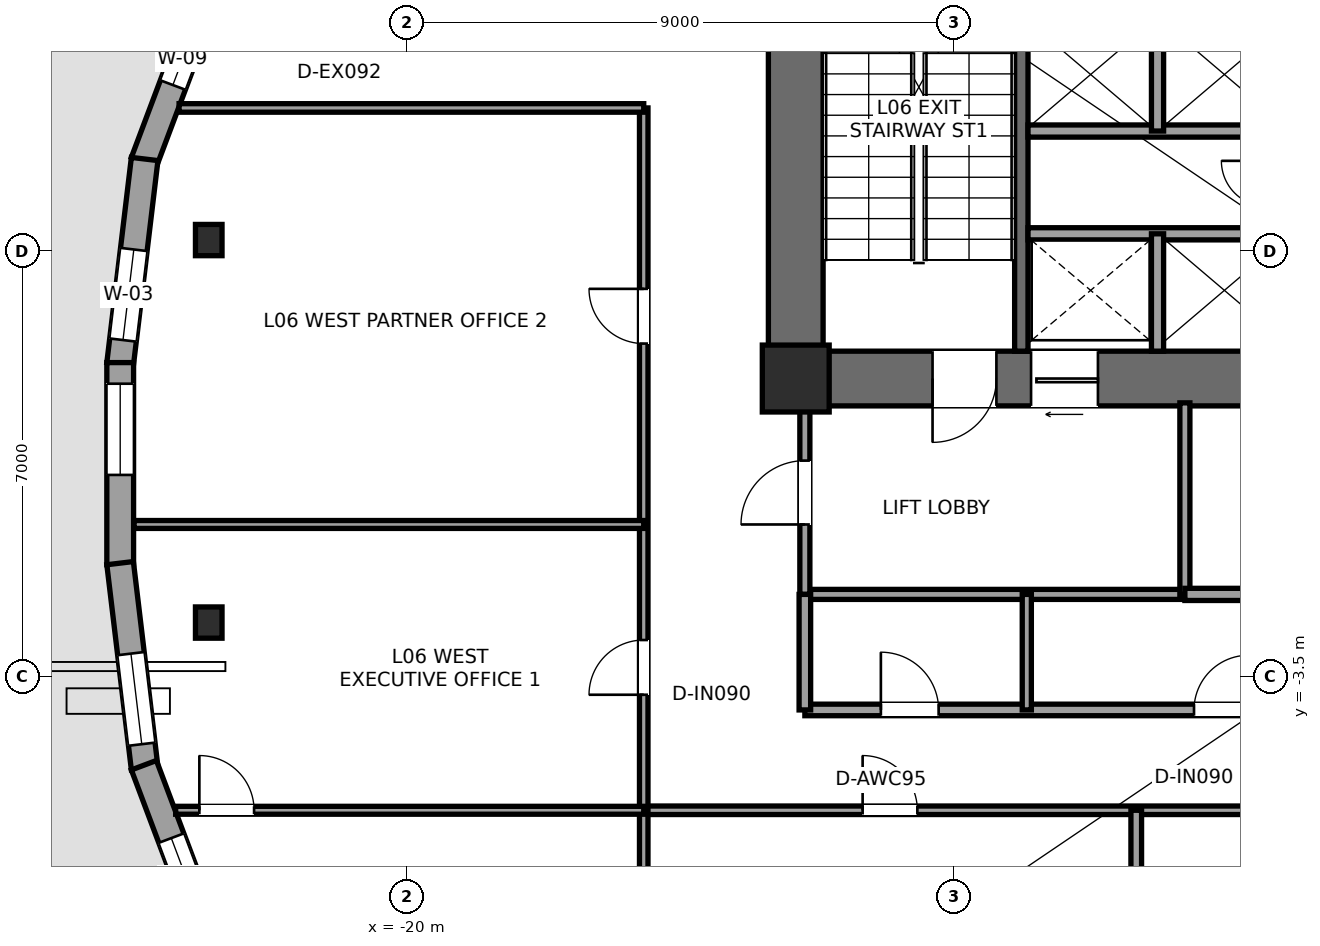
"""IFC4 building model, lengths in metres.
Left out: names, types, materials, properties, quantities, classifications, styles, units other than length and angle.
Written with IfcOpenShell. Run it as: python <this file> out.ifc"""

import sys

from ifc_helpers import new_model, si_unit, direction, frame, frame_2d, origin, origin_2d, place, context, subcontext, project, spatial, rectangle, i_section, extrude, element, fill, save


model = new_model("IFC4")
c1 = context("Model", 3, precision=1e-05, world=origin(), true_north=direction((0.0, 1.0)))
c2 = subcontext(c1, "Body", "Model", "MODEL_VIEW")
j1 = project(units=[si_unit("LENGTHUNIT", "METRE"), si_unit("PLANEANGLEUNIT", "RADIAN")], contexts=[c1])
p1 = place(None, origin())
s1 = spatial("IfcSite", under=j1, at=p1, CompositionType="ELEMENT")
p2 = place(p1, origin())
s2 = spatial("IfcBuilding", under=s1, at=p2, CompositionType="ELEMENT")
p3 = place(p2, frame((0.0, 0.0, 27.0)))
s3 = spatial("IfcBuildingStorey", under=s2, at=p3, CompositionType="ELEMENT", Elevation=27.0)
p4 = place(p3, frame((-13.6, 0.95, 0.0), z_axis=(0.0, 0.0, 1.0), x_axis=(0.0, 1.0, 0.0)))
e1 = element("IfcWall", 1, at=p4, inside=s3, PredefinedType="SHEAR", context=c2, shape_type="SweptSolid", body=[
    extrude(rectangle(XDim=8.95, YDim=0.9, at=frame_2d((4.475, 0.0))), origin(), (0.0, 0.0, 1.0), 3.6),
])
p5 = place(p3, frame((-4.75, 1.4, 0.0), z_axis=(0.0, 0.0, 1.0), x_axis=(-1.0, 0.0, 0.0)))
e2 = element("IfcWall", 2, at=p5, inside=s3, PredefinedType="SHEAR", context=c2, shape_type="SweptSolid", body=[
    extrude(rectangle(XDim=9.3, YDim=0.9, at=frame_2d((4.65, 0.0))), origin(), (0.0, 0.0, 1.0), 3.6),
])
p6 = place(p5, frame((5.55, 0.0, 0.0)))
e3 = element("IfcOpeningElement", 3, at=p6, cuts=e2, PredefinedType="OPENING", context=c2, shape_type="SweptSolid", body=[
    extrude(rectangle(XDim=1.05, YDim=2.15, at=frame_2d((0.525, 1.075))), frame((0.0, 0.46, 0.0), z_axis=(0.0, -1.0, 0.0), x_axis=(1.0, 0.0, 0.0)), (0.0, 0.0, 1.0), 0.92),
])
p7 = place(p5, frame((3.88, 0.0, 0.0)))
e4 = element("IfcOpeningElement", 4, at=p7, cuts=e2, PredefinedType="OPENING", context=c2, shape_type="SweptSolid", body=[
    extrude(rectangle(XDim=1.1, YDim=2.2, at=frame_2d((0.55, 1.1))), frame((0.0, 0.46, 0.0), z_axis=(0.0, -1.0, 0.0), x_axis=(1.0, 0.0, 0.0)), (0.0, 0.0, 1.0), 0.92),
])
p8 = place(p3, frame((-9.89, 1.85, 0.0), z_axis=(0.0, 0.0, 1.0), x_axis=(0.0, 1.0, 0.0)))
e5 = element("IfcWall", 5, at=p8, inside=s3, PredefinedType="SHEAR", context=c2, shape_type="SweptSolid", body=[
    extrude(rectangle(XDim=7.15, YDim=0.22, at=frame_2d((3.575, 0.0))), origin(), (0.0, 0.0, 1.0), 3.6),
])
p9 = place(p3, frame((-13.6, 1.4, 0.0), z_axis=(0.0, 0.0, 1.0), x_axis=(1.0, 0.0, 0.0)))
e6 = element("IfcColumn", 6, at=p9, inside=s3, PredefinedType="COLUMN", context=c2, shape_type="SweptSolid", body=[
    extrude(rectangle(XDim=1.1, YDim=1.1, at=origin_2d()), origin(), (0.0, 0.0, 1.0), 3.6),
])
for number, where, z_axis, x_axis in (
    (7, (-23.254, 3.677, 0.0), (0.0, 0.0, 1.0), (1.0, 0.0, 0.0)),
    (8, (-23.254, -2.613, 0.0), (0.0, 0.0, 1.0), (1.0, 0.0, 0.0)),
):
    element("IfcColumn", number, at=place(p3, frame(where, z_axis=z_axis, x_axis=x_axis)), inside=s3, PredefinedType="COLUMN", context=c2, shape_type="SweptSolid", body=[
        extrude(i_section(OverallWidth=0.437, OverallDepth=0.514, WebThickness=0.061, FlangeThickness=0.097, at=origin_2d()), origin(), (0.0, 0.0, 1.0), 3.6),
    ])
p10 = place(p3, frame((-24.321, 4.959, 0.0), z_axis=(0.0, 0.0, 1.0), x_axis=(0.351960996761, 0.936014666957, 0.0)))
e9 = element("IfcWall", 9, at=p10, inside=s3, PredefinedType="STANDARD", context=c2, shape_type="SweptSolid", body=[
    extrude(rectangle(XDim=3.609, YDim=0.44, at=frame_2d((1.805, 0.0))), origin(), (0.0, 0.0, 1.0), 2.533),
])
p11 = place(p10, frame((1.354, 0.0, 0.58)))
e10 = element("IfcOpeningElement", 10, at=p11, cuts=e9, PredefinedType="OPENING", context=c2, shape_type="SweptSolid", body=[
    extrude(rectangle(XDim=0.9, YDim=1.35, at=frame_2d((0.45, 0.675))), frame((0.0, 0.23, 0.0), z_axis=(0.0, -1.0, 0.0), x_axis=(1.0, 0.0, 0.0)), (0.0, 0.0, 1.0), 0.46),
])
p12 = place(p3, frame((-24.712, 1.636, 0.0), z_axis=(0.0, 0.0, 1.0), x_axis=(0.118754274869, 0.992923673905, 0.0)))
e11 = element("IfcWall", 11, at=p12, inside=s3, PredefinedType="STANDARD", context=c2, shape_type="SweptSolid", body=[
    extrude(rectangle(XDim=3.398, YDim=0.44, at=frame_2d((1.699, 0.0))), origin(), (0.0, 0.0, 1.0), 2.533),
])
p13 = place(p12, frame((0.4, 0.0, 0.65)))
e12 = element("IfcOpeningElement", 12, at=p13, cuts=e11, PredefinedType="OPENING", context=c2, shape_type="SweptSolid", body=[
    extrude(rectangle(XDim=1.5, YDim=1.7, at=frame_2d((0.75, 0.85))), frame((0.0, 0.23, 0.0), z_axis=(0.0, -1.0, 0.0), x_axis=(1.0, 0.0, 0.0)), (0.0, 0.0, 1.0), 0.46),
])
p14 = place(p3, frame((-24.71, -1.662, 0.0), z_axis=(0.0, 0.0, 1.0), x_axis=(0.0, 1.0, 0.0)))
e13 = element("IfcWall", 13, at=p14, inside=s3, PredefinedType="STANDARD", context=c2, shape_type="SweptSolid", body=[
    extrude(rectangle(XDim=3.324, YDim=0.44, at=frame_2d((1.662, 0.0))), origin(), (0.0, 0.0, 1.0), 2.533),
])
p15 = place(p14, frame((1.477, 0.0, 0.65)))
e14 = element("IfcOpeningElement", 14, at=p15, cuts=e13, PredefinedType="OPENING", context=c2, shape_type="SweptSolid", body=[
    extrude(rectangle(XDim=1.5, YDim=1.7, at=frame_2d((0.75, 0.85))), frame((0.0, 0.23, 0.0), z_axis=(0.0, -1.0, 0.0), x_axis=(1.0, 0.0, 0.0)), (0.0, 0.0, 1.0), 0.46),
])
p16 = place(p3, frame((-24.308, -5.01, 0.0), z_axis=(0.0, 0.0, 1.0), x_axis=(-0.118754274869, 0.992923673905, 0.0)))
e15 = element("IfcWall", 15, at=p16, inside=s3, PredefinedType="STANDARD", context=c2, shape_type="SweptSolid", body=[
    extrude(rectangle(XDim=3.398, YDim=0.44, at=frame_2d((1.699, 0.0))), origin(), (0.0, 0.0, 1.0), 2.533),
])
p17 = place(p16, frame((0.4, 0.0, 0.65)))
e16 = element("IfcOpeningElement", 16, at=p17, cuts=e15, PredefinedType="OPENING", context=c2, shape_type="SweptSolid", body=[
    extrude(rectangle(XDim=1.5, YDim=1.7, at=frame_2d((0.75, 0.85))), frame((0.0, 0.23, 0.0), z_axis=(0.0, -1.0, 0.0), x_axis=(1.0, 0.0, 0.0)), (0.0, 0.0, 1.0), 0.46),
])
p18 = place(p3, frame((-23.05, -8.337, 0.0), z_axis=(0.0, 0.0, 1.0), x_axis=(-0.351960996761, 0.936014666957, 0.0)))
e17 = element("IfcWall", 17, at=p18, inside=s3, PredefinedType="STANDARD", context=c2, shape_type="SweptSolid", body=[
    extrude(rectangle(XDim=3.609, YDim=0.44, at=frame_2d((1.805, 0.0))), origin(), (0.0, 0.0, 1.0), 2.533),
])
p19 = place(p18, frame((1.428, 0.0, 0.58)))
e18 = element("IfcOpeningElement", 18, at=p19, cuts=e17, PredefinedType="OPENING", context=c2, shape_type="SweptSolid", body=[
    extrude(rectangle(XDim=0.9, YDim=1.35, at=frame_2d((0.45, 0.675))), frame((0.0, 0.23, 0.0), z_axis=(0.0, -1.0, 0.0), x_axis=(1.0, 0.0, 0.0)), (0.0, 0.0, 1.0), 0.46),
])
p20 = place(p3, frame((-13.45, -2.15, 0.0), z_axis=(0.0, 0.0, 1.0), x_axis=(1.0, 0.0, 0.0)))
e19 = element("IfcWall", 19, at=p20, inside=s3, PredefinedType="PARTITIONING", context=c2, shape_type="SweptSolid", body=[
    extrude(rectangle(XDim=6.25, YDim=0.165, at=frame_2d((3.125, 0.0))), origin(), (0.0, 0.0, 1.0), 3.4),
])
p21 = place(p3, frame((-13.45, -2.15, 0.0), z_axis=(0.0, 0.0, 1.0), x_axis=(0.0, 1.0, 0.0)))
e20 = element("IfcWall", 20, at=p21, inside=s3, PredefinedType="PARTITIONING", context=c2, shape_type="SweptSolid", body=[
    extrude(rectangle(XDim=3.15, YDim=0.165, at=frame_2d((1.575, 0.0))), origin(), (0.0, 0.0, 1.0), 2.853),
])
p22 = place(p21, frame((1.15, 0.0, 0.0)))
e21 = element("IfcOpeningElement", 21, at=p22, cuts=e20, PredefinedType="OPENING", context=c2, shape_type="SweptSolid", body=[
    extrude(rectangle(XDim=1.05, YDim=2.15, at=frame_2d((0.525, 1.075))), frame((0.0, 0.093, 0.0), z_axis=(0.0, -1.0, 0.0), x_axis=(1.0, 0.0, 0.0)), (0.0, 0.0, 1.0), 0.185),
])
p23 = place(p3, frame((-7.2, -2.15, 0.0), z_axis=(0.0, 0.0, 1.0), x_axis=(0.0, 1.0, 0.0)))
e22 = element("IfcWall", 22, at=p23, inside=s3, PredefinedType="PARTITIONING", context=c2, shape_type="SweptSolid", body=[
    extrude(rectangle(XDim=3.15, YDim=0.165, at=frame_2d((1.575, 0.0))), origin(), (0.0, 0.0, 1.0), 2.853),
])
p24 = place(p3, frame((-7.2, -2.15, 0.0), z_axis=(0.0, 0.0, 1.0), x_axis=(1.0, 0.0, 0.0)))
e23 = element("IfcWall", 23, at=p24, inside=s3, PredefinedType="SOLIDWALL", context=c2, shape_type="SweptSolid", body=[
    extrude(rectangle(XDim=2.25, YDim=0.2, at=frame_2d((1.125, 0.0))), origin(), (0.0, 0.0, 1.0), 3.4),
])
p25 = place(p3, frame((-9.78, 3.78, 0.0), z_axis=(0.0, 0.0, 1.0), x_axis=(1.0, 0.0, 0.0)))
e24 = element("IfcWall", 24, at=p25, inside=s3, PredefinedType="SOLIDWALL", context=c2, shape_type="SweptSolid", body=[
    extrude(rectangle(XDim=4.13, YDim=0.2, at=frame_2d((2.065, 0.0))), origin(), (0.0, 0.0, 1.0), 3.4),
])
p26 = place(p3, frame((-7.65, 1.85, 0.0), z_axis=(0.0, 0.0, 1.0), x_axis=(0.0, 1.0, 0.0)))
e25 = element("IfcWall", 25, at=p26, inside=s3, PredefinedType="SOLIDWALL", context=c2, shape_type="SweptSolid", body=[
    extrude(rectangle(XDim=1.93, YDim=0.2, at=frame_2d((0.965, 0.0))), origin(), (0.0, 0.0, 1.0), 3.4),
])
p27 = place(p3, frame((-9.78, 5.47, 0.0), z_axis=(0.0, 0.0, 1.0), x_axis=(1.0, 0.0, 0.0)))
e26 = element("IfcWall", 26, at=p27, inside=s3, PredefinedType="SOLIDWALL", context=c2, shape_type="SweptSolid", body=[
    extrude(rectangle(XDim=4.13, YDim=0.2, at=frame_2d((2.065, 0.0))), origin(), (0.0, 0.0, 1.0), 3.4),
])
p28 = place(p3, frame((-7.65, 5.47, 0.0), z_axis=(0.0, 0.0, 1.0), x_axis=(0.0, 1.0, 0.0)))
e27 = element("IfcWall", 27, at=p28, inside=s3, PredefinedType="SOLIDWALL", context=c2, shape_type="SweptSolid", body=[
    extrude(rectangle(XDim=1.86, YDim=0.2, at=frame_2d((0.93, 0.0))), origin(), (0.0, 0.0, 1.0), 3.4),
])
p29 = place(p3, frame((-13.45, -4.05, 0.0), z_axis=(0.0, 0.0, 1.0), x_axis=(1.0, 0.0, 0.0)))
e28 = element("IfcWall", 28, at=p29, inside=s3, PredefinedType="PLUMBINGWALL", context=c2, shape_type="SweptSolid", body=[
    extrude(rectangle(XDim=11.35, YDim=0.19, at=frame_2d((5.675, 0.0))), origin(), (0.0, 0.0, 1.0), 2.853),
])
p30 = place(p29, frame((1.25, 0.0, 0.0)))
e29 = element("IfcOpeningElement", 29, at=p30, cuts=e28, PredefinedType="OPENING", context=c2, shape_type="SweptSolid", body=[
    extrude(rectangle(XDim=0.95, YDim=2.15, at=frame_2d((0.475, 1.075))), frame((0.0, 0.105, 0.0), z_axis=(0.0, -1.0, 0.0), x_axis=(1.0, 0.0, 0.0)), (0.0, 0.0, 1.0), 0.21),
])
p31 = place(p29, frame((6.4, 0.0, 0.0)))
e30 = element("IfcOpeningElement", 30, at=p31, cuts=e28, PredefinedType="OPENING", context=c2, shape_type="SweptSolid", body=[
    extrude(rectangle(XDim=0.9, YDim=2.1, at=frame_2d((0.45, 1.05))), frame((0.0, 0.105, 0.0), z_axis=(0.0, -1.0, 0.0), x_axis=(1.0, 0.0, 0.0)), (0.0, 0.0, 1.0), 0.21),
])
p32 = place(p3, frame((-13.45, -4.05, 0.0), z_axis=(0.0, 0.0, 1.0), x_axis=(0.0, 1.0, 0.0)))
e31 = element("IfcWall", 31, at=p32, inside=s3, PredefinedType="PLUMBINGWALL", context=c2, shape_type="SweptSolid", body=[
    extrude(rectangle(XDim=1.9, YDim=0.19, at=frame_2d((0.95, 0.0))), origin(), (0.0, 0.0, 1.0), 2.853),
])
p33 = place(p3, frame((-9.8, -4.05, 0.0), z_axis=(0.0, 0.0, 1.0), x_axis=(0.0, 1.0, 0.0)))
e32 = element("IfcWall", 32, at=p33, inside=s3, PredefinedType="PLUMBINGWALL", context=c2, shape_type="SweptSolid", body=[
    extrude(rectangle(XDim=1.9, YDim=0.15, at=frame_2d((0.95, 0.0))), origin(), (0.0, 0.0, 1.0), 2.853),
])
p34 = place(p3, frame((-16.1, -5.7, 0.0), z_axis=(0.0, 0.0, 1.0), x_axis=(1.0, 0.0, 0.0)))
e33 = element("IfcWall", 33, at=p34, inside=s3, PredefinedType="PARTITIONING", context=c2, shape_type="SweptSolid", body=[
    extrude(rectangle(XDim=32.2, YDim=0.14, at=frame_2d((16.1, 0.0))), origin(), (0.0, 0.0, 1.0), 2.853),
])
p35 = place(p34, frame((3.6, 0.0, 0.0)))
e34 = element("IfcOpeningElement", 34, at=p35, cuts=e33, PredefinedType="OPENING", context=c2, shape_type="SweptSolid", body=[
    extrude(rectangle(XDim=0.9, YDim=2.1, at=frame_2d((0.45, 1.05))), frame((0.0, 0.08, 0.0), z_axis=(0.0, -1.0, 0.0), x_axis=(1.0, 0.0, 0.0)), (0.0, 0.0, 1.0), 0.16),
])
p36 = place(p34, frame((11.35, 0.0, 0.0)))
e35 = element("IfcOpeningElement", 35, at=p36, cuts=e33, PredefinedType="OPENING", context=c2, shape_type="SweptSolid", body=[
    extrude(rectangle(XDim=1.5, YDim=2.15, at=frame_2d((0.75, 1.075))), frame((0.0, 0.08, 0.0), z_axis=(0.0, -1.0, 0.0), x_axis=(1.0, 0.0, 0.0)), (0.0, 0.0, 1.0), 0.16),
])
p37 = place(p34, frame((19.65, 0.0, 0.0)))
e36 = element("IfcOpeningElement", 36, at=p37, cuts=e33, PredefinedType="OPENING", context=c2, shape_type="SweptSolid", body=[
    extrude(rectangle(XDim=0.9, YDim=2.1, at=frame_2d((0.45, 1.05))), frame((0.0, 0.08, 0.0), z_axis=(0.0, -1.0, 0.0), x_axis=(1.0, 0.0, 0.0)), (0.0, 0.0, 1.0), 0.16),
])
p38 = place(p34, frame((27.7, 0.0, 0.0)))
e37 = element("IfcOpeningElement", 37, at=p38, cuts=e33, PredefinedType="OPENING", context=c2, shape_type="SweptSolid", body=[
    extrude(rectangle(XDim=0.9, YDim=2.1, at=frame_2d((0.45, 1.05))), frame((0.0, 0.08, 0.0), z_axis=(0.0, -1.0, 0.0), x_axis=(1.0, 0.0, 0.0)), (0.0, 0.0, 1.0), 0.16),
])
p39 = place(p3, frame((-16.1, -13.977, 0.0), z_axis=(0.0, 0.0, 1.0), x_axis=(0.0, 1.0, 0.0)))
e38 = element("IfcWall", 38, at=p39, inside=s3, PredefinedType="PARTITIONING", context=c2, shape_type="SweptSolid", body=[
    extrude(rectangle(XDim=19.827, YDim=0.14, at=frame_2d((9.914, 0.0))), origin(), (0.0, 0.0, 1.0), 2.841),
])
p40 = place(p39, frame((10.177, 0.0, 0.0)))
e39 = element("IfcOpeningElement", 39, at=p40, cuts=e38, PredefinedType="OPENING", context=c2, shape_type="SweptSolid", body=[
    extrude(rectangle(XDim=0.9, YDim=2.1, at=frame_2d((0.45, 1.05))), frame((0.0, 0.08, 0.0), z_axis=(0.0, -1.0, 0.0), x_axis=(1.0, 0.0, 0.0)), (0.0, 0.0, 1.0), 0.16),
])
p41 = place(p39, frame((15.952, 0.0, 0.0)))
e40 = element("IfcOpeningElement", 40, at=p41, cuts=e38, PredefinedType="OPENING", context=c2, shape_type="SweptSolid", body=[
    extrude(rectangle(XDim=0.9, YDim=2.1, at=frame_2d((0.45, 1.05))), frame((0.0, 0.08, 0.0), z_axis=(0.0, -1.0, 0.0), x_axis=(1.0, 0.0, 0.0)), (0.0, 0.0, 1.0), 0.16),
])
p42 = place(p3, frame((-23.742, 5.85, 0.0), z_axis=(0.0, 0.0, 1.0), x_axis=(1.0, 0.0, 0.0)))
e41 = element("IfcWall", 41, at=p42, inside=s3, PredefinedType="PARTITIONING", context=c2, shape_type="SweptSolid", body=[
    extrude(rectangle(XDim=7.642, YDim=0.14, at=frame_2d((3.821, 0.0))), origin(), (0.0, 0.0, 1.0), 3.4),
])
p43 = place(p3, frame((-8.0, -16.052, 0.0), z_axis=(0.0, 0.0, 1.0), x_axis=(0.0, 1.0, 0.0)))
e42 = element("IfcWall", 42, at=p43, inside=s3, PredefinedType="PARTITIONING", context=c2, shape_type="SweptSolid", body=[
    extrude(rectangle(XDim=10.352, YDim=0.175, at=frame_2d((5.176, 0.0))), origin(), (0.0, 0.0, 1.0), 2.853),
])
p44 = place(p3, frame((-23.798, -5.7, 0.0), z_axis=(0.0, 0.0, 1.0), x_axis=(1.0, 0.0, 0.0)))
e43 = element("IfcWall", 43, at=p44, inside=s3, PredefinedType="PARTITIONING", context=c2, shape_type="SweptSolid", body=[
    extrude(rectangle(XDim=7.698, YDim=0.13, at=frame_2d((3.849, 0.0))), origin(), (0.0, 0.0, 1.0), 2.779),
])
p45 = place(p44, frame((0.39, 0.0, 0.0)))
e44 = element("IfcOpeningElement", 44, at=p45, cuts=e43, PredefinedType="OPENING", context=c2, shape_type="SweptSolid", body=[
    extrude(rectangle(XDim=0.9, YDim=2.1, at=frame_2d((0.45, 1.05))), frame((0.0, 0.075, 0.0), z_axis=(0.0, -1.0, 0.0), x_axis=(1.0, 0.0, 0.0)), (0.0, 0.0, 1.0), 0.15),
])
p46 = place(p3, frame((-24.482, -1.0, 0.0), z_axis=(0.0, 0.0, 1.0), x_axis=(1.0, 0.0, 0.0)))
e45 = element("IfcWall", 45, at=p46, inside=s3, PredefinedType="PARTITIONING", context=c2, shape_type="SweptSolid", body=[
    extrude(rectangle(XDim=8.382, YDim=0.13, at=frame_2d((4.191, 0.0))), origin(), (0.0, 0.0, 1.0), 2.841),
])
p47 = place(p11, origin())
e46 = element("IfcWindow", 46, at=p47, inside=s3, PartitioningType="SINGLE_PANEL", PredefinedType="WINDOW", context=c2, shape_type="SweptSolid", body=[
    extrude(rectangle(XDim=0.9, YDim=1.35, at=frame_2d((0.45, 0.675))), frame((0.0, -0.01, 0.0), z_axis=(0.0, -1.0, 0.0), x_axis=(1.0, 0.0, 0.0)), (0.0, 0.0, 1.0), 0.06),
])
fill(e10, e46)
p48 = place(p13, origin())
e47 = element("IfcWindow", 47, at=p48, inside=s3, PartitioningType="SINGLE_PANEL", PredefinedType="WINDOW", context=c2, shape_type="SweptSolid", body=[
    extrude(rectangle(XDim=1.5, YDim=1.7, at=frame_2d((0.75, 0.85))), frame((0.0, -0.01, 0.0), z_axis=(0.0, -1.0, 0.0), x_axis=(1.0, 0.0, 0.0)), (0.0, 0.0, 1.0), 0.06),
])
fill(e12, e47)
p49 = place(p15, origin())
e48 = element("IfcWindow", 48, at=p49, inside=s3, PartitioningType="SINGLE_PANEL", PredefinedType="WINDOW", context=c2, shape_type="SweptSolid", body=[
    extrude(rectangle(XDim=1.5, YDim=1.7, at=frame_2d((0.75, 0.85))), frame((0.0, -0.01, 0.0), z_axis=(0.0, -1.0, 0.0), x_axis=(1.0, 0.0, 0.0)), (0.0, 0.0, 1.0), 0.06),
])
fill(e14, e48)
p50 = place(p17, origin())
e49 = element("IfcWindow", 49, at=p50, inside=s3, PartitioningType="SINGLE_PANEL", PredefinedType="WINDOW", context=c2, shape_type="SweptSolid", body=[
    extrude(rectangle(XDim=1.5, YDim=1.7, at=frame_2d((0.75, 0.85))), frame((0.0, -0.01, 0.0), z_axis=(0.0, -1.0, 0.0), x_axis=(1.0, 0.0, 0.0)), (0.0, 0.0, 1.0), 0.06),
])
fill(e16, e49)
p51 = place(p19, origin())
e50 = element("IfcWindow", 50, at=p51, inside=s3, PartitioningType="SINGLE_PANEL", PredefinedType="WINDOW", context=c2, shape_type="SweptSolid", body=[
    extrude(rectangle(XDim=0.9, YDim=1.35, at=frame_2d((0.45, 0.675))), frame((0.0, -0.01, 0.0), z_axis=(0.0, -1.0, 0.0), x_axis=(1.0, 0.0, 0.0)), (0.0, 0.0, 1.0), 0.06),
])
fill(e18, e50)
p52 = place(p6, origin())
e51 = element("IfcDoor", 51, at=p52, inside=s3, OperationType="SINGLE_SWING_RIGHT", PredefinedType="DOOR", context=c2, shape_type="SweptSolid", body=[
    extrude(rectangle(XDim=1.05, YDim=2.15, at=frame_2d((0.525, 1.075))), frame((0.0, 0.025, 0.0), z_axis=(0.0, -1.0, 0.0), x_axis=(1.0, 0.0, 0.0)), (0.0, 0.0, 1.0), 0.05),
])
fill(e3, e51)
p53 = place(p22, origin())
e52 = element("IfcDoor", 52, at=p53, inside=s3, OperationType="SINGLE_SWING_LEFT", PredefinedType="DOOR", context=c2, shape_type="SweptSolid", body=[
    extrude(rectangle(XDim=1.05, YDim=2.15, at=frame_2d((0.525, 1.075))), frame((0.0, 0.025, 0.0), z_axis=(0.0, -1.0, 0.0), x_axis=(1.0, 0.0, 0.0)), (0.0, 0.0, 1.0), 0.05),
])
fill(e21, e52)
p54 = place(p7, origin())
e53 = element("IfcDoor", 53, at=p54, inside=s3, OperationType="SLIDING_TO_LEFT", PredefinedType="DOOR", context=c2, shape_type="SweptSolid", body=[
    extrude(rectangle(XDim=1.1, YDim=2.2, at=frame_2d((0.55, 1.1))), frame((0.0, 0.025, 0.0), z_axis=(0.0, -1.0, 0.0), x_axis=(1.0, 0.0, 0.0)), (0.0, 0.0, 1.0), 0.05),
])
fill(e4, e53)
p55 = place(p30, origin())
e54 = element("IfcDoor", 54, at=p55, inside=s3, OperationType="SINGLE_SWING_LEFT", PredefinedType="DOOR", context=c2, shape_type="SweptSolid", body=[
    extrude(rectangle(XDim=0.95, YDim=2.15, at=frame_2d((0.475, 1.075))), frame((0.0, 0.025, 0.0), z_axis=(0.0, -1.0, 0.0), x_axis=(1.0, 0.0, 0.0)), (0.0, 0.0, 1.0), 0.05),
])
fill(e29, e54)
p56 = place(p31, origin())
e55 = element("IfcDoor", 55, at=p56, inside=s3, OperationType="SINGLE_SWING_RIGHT", PredefinedType="DOOR", context=c2, shape_type="SweptSolid", body=[
    extrude(rectangle(XDim=0.9, YDim=2.1, at=frame_2d((0.45, 1.05))), frame((0.0, 0.025, 0.0), z_axis=(0.0, -1.0, 0.0), x_axis=(1.0, 0.0, 0.0)), (0.0, 0.0, 1.0), 0.05),
])
fill(e30, e55)
p57 = place(p35, origin())
e56 = element("IfcDoor", 56, at=p57, inside=s3, OperationType="SINGLE_SWING_LEFT", PredefinedType="DOOR", context=c2, shape_type="SweptSolid", body=[
    extrude(rectangle(XDim=0.9, YDim=2.1, at=frame_2d((0.45, 1.05))), frame((0.0, 0.025, 0.0), z_axis=(0.0, -1.0, 0.0), x_axis=(1.0, 0.0, 0.0)), (0.0, 0.0, 1.0), 0.05),
])
fill(e34, e56)
p58 = place(p45, origin())
e57 = element("IfcDoor", 57, at=p58, inside=s3, OperationType="SINGLE_SWING_LEFT", PredefinedType="DOOR", context=c2, shape_type="SweptSolid", body=[
    extrude(rectangle(XDim=0.9, YDim=2.1, at=frame_2d((0.45, 1.05))), frame((0.0, 0.025, 0.0), z_axis=(0.0, -1.0, 0.0), x_axis=(1.0, 0.0, 0.0)), (0.0, 0.0, 1.0), 0.05),
])
fill(e44, e57)
p59 = place(p40, origin())
e58 = element("IfcDoor", 58, at=p59, inside=s3, OperationType="SINGLE_SWING_LEFT", PredefinedType="DOOR", context=c2, shape_type="SweptSolid", body=[
    extrude(rectangle(XDim=0.9, YDim=2.1, at=frame_2d((0.45, 1.05))), frame((0.0, 0.025, 0.0), z_axis=(0.0, -1.0, 0.0), x_axis=(1.0, 0.0, 0.0)), (0.0, 0.0, 1.0), 0.05),
])
fill(e39, e58)
p60 = place(p41, origin())
e59 = element("IfcDoor", 59, at=p60, inside=s3, OperationType="SINGLE_SWING_RIGHT", PredefinedType="DOOR", context=c2, shape_type="SweptSolid", body=[
    extrude(rectangle(XDim=0.9, YDim=2.1, at=frame_2d((0.45, 1.05))), frame((0.0, 0.025, 0.0), z_axis=(0.0, -1.0, 0.0), x_axis=(1.0, 0.0, 0.0)), (0.0, 0.0, 1.0), 0.05),
])
fill(e40, e59)
save(model, sys.argv[1])
